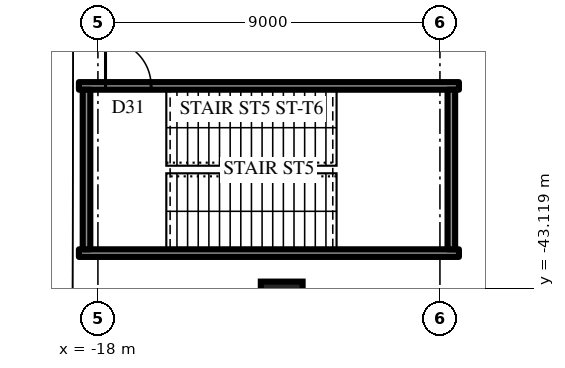
"""IFC4 building model, lengths in metres.
Left out: names, types, materials, properties, quantities, classifications, styles, units other than length and angle.
Written with IfcOpenShell. Run it as: python <this file> out.ifc"""

import sys

from ifc_helpers import new_model, si_unit, direction, frame, frame_2d, origin, origin_2d, place, context, subcontext, project, spatial, rectangle, extrude, element, fill, save


model = new_model("IFC4")
c1 = context("Model", 3, precision=1e-05, world=origin(), true_north=direction((0.0, 1.0)))
c2 = subcontext(c1, "Body", "Model", "MODEL_VIEW")
j1 = project(units=[si_unit("LENGTHUNIT", "METRE"), si_unit("PLANEANGLEUNIT", "RADIAN")], contexts=[c1])
p1 = place(None, origin())
s1 = spatial("IfcSite", under=j1, at=p1, CompositionType="ELEMENT")
p2 = place(p1, origin())
s2 = spatial("IfcBuilding", under=s1, at=p2, CompositionType="ELEMENT")
p3 = place(p2, frame((0.0, 0.0, 7.0)))
s3 = spatial("IfcBuildingStorey", under=s2, at=p3, CompositionType="ELEMENT", Elevation=7.0)
p4 = place(p3, frame((-18.5, -42.2, 0.0), z_axis=(0.0, 0.0, 1.0), x_axis=(1.0, 0.0, 0.0)))
e1 = element("IfcWall", 1, at=p4, inside=s3, PredefinedType="SHEAR", context=c2, shape_type="SweptSolid", body=[
    extrude(rectangle(XDim=10.0, YDim=0.2, at=frame_2d((5.0, 0.0))), origin(), (0.0, 0.0, 1.0), 6.0),
])
p5 = place(p3, frame((-8.5, -37.8, 0.0), z_axis=(0.0, 0.0, 1.0), x_axis=(-1.0, 0.0, 0.0)))
e2 = element("IfcWall", 2, at=p5, inside=s3, PredefinedType="SHEAR", context=c2, shape_type="SweptSolid", body=[
    extrude(rectangle(XDim=10.0, YDim=0.2, at=frame_2d((5.0, 0.0))), origin(), (0.0, 0.0, 1.0), 6.0),
])
p6 = place(p5, frame((8.1, 0.0, 0.0)))
e3 = element("IfcOpeningElement", 3, at=p6, cuts=e2, PredefinedType="OPENING", context=c2, shape_type="SweptSolid", body=[
    extrude(rectangle(XDim=1.2, YDim=2.2, at=frame_2d((0.6, 1.1))), frame((0.0, 0.11, 0.0), z_axis=(0.0, -1.0, 0.0), x_axis=(1.0, 0.0, 0.0)), (0.0, 0.0, 1.0), 0.22),
])
for number, where, z_axis, x_axis in (
    (4, (-18.3, -37.9, 0.0), (0.0, 0.0, 1.0), (0.0, -1.0, 0.0)),
    (5, (-8.7, -42.1, 0.0), (0.0, 0.0, 1.0), (0.0, 1.0, 0.0)),
):
    element("IfcWall", number, at=place(p3, frame(where, z_axis=z_axis, x_axis=x_axis)), inside=s3, PredefinedType="SHEAR", context=c2, shape_type="SweptSolid", body=[
        extrude(rectangle(XDim=4.2, YDim=0.2, at=frame_2d((2.1, 0.0))), origin(), (0.0, 0.0, 1.0), 6.0),
    ])
p7 = place(p3, frame((-13.164, -43.5, 0.0), z_axis=(0.0, 0.0, 1.0), x_axis=(1.0, 0.0, 0.0)))
e6 = element("IfcColumn", 6, at=p7, inside=s3, PredefinedType="COLUMN", context=c2, shape_type="SweptSolid", body=[
    extrude(rectangle(XDim=1.1, YDim=1.1, at=origin_2d()), origin(), (0.0, 0.0, 1.0), 6.0),
])
p8 = place(p6, frame((1.2, 0.0, 0.0), z_axis=(0.0, 0.0, 1.0), x_axis=(-1.0, 0.0, 0.0)))
e7 = element("IfcDoor", 7, at=p8, inside=s3, OperationType="SINGLE_SWING_RIGHT", PredefinedType="DOOR", context=c2, shape_type="SweptSolid", body=[
    extrude(rectangle(XDim=1.2, YDim=2.2, at=frame_2d((0.6, 1.1))), frame((0.0, 0.025, 0.0), z_axis=(0.0, -1.0, 0.0), x_axis=(1.0, 0.0, 0.0)), (0.0, 0.0, 1.0), 0.05),
])
fill(e3, e7)
save(model, sys.argv[1])
